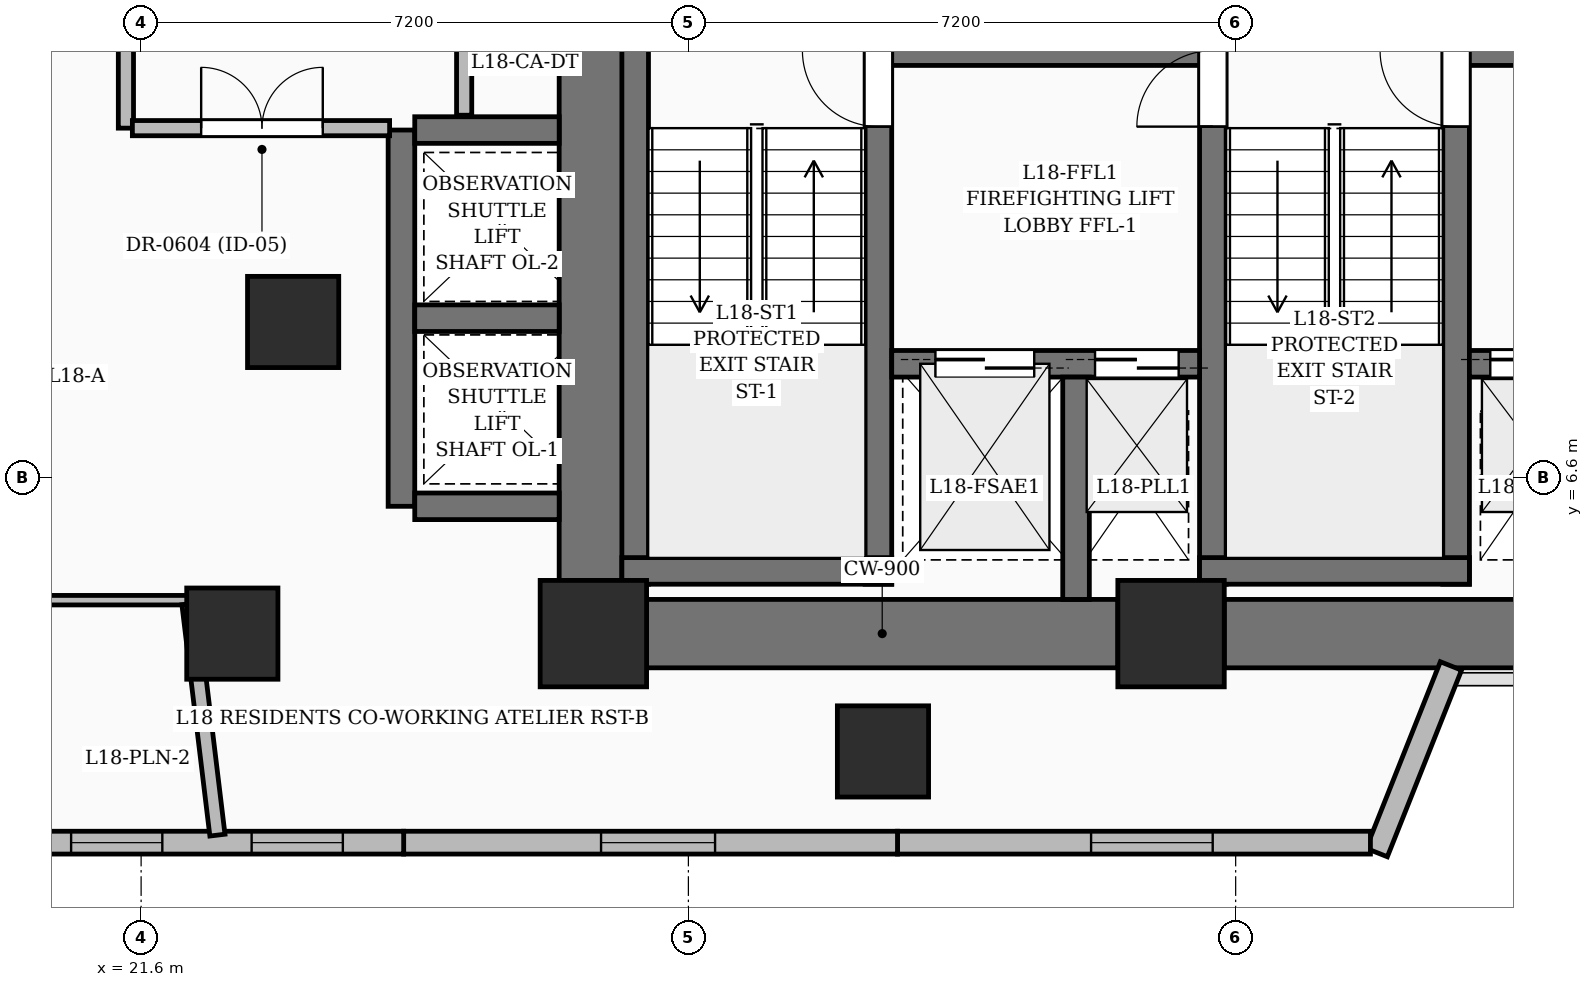
"""IFC4 building model, lengths in metres.
Left out: names, types, materials, properties, quantities, classifications, styles, units other than length and angle.
Written with IfcOpenShell. Run it as: python <this file> out.ifc"""

import sys

from ifc_helpers import new_model, si_unit, direction, frame, frame_2d, origin, origin_2d, place, context, subcontext, project, spatial, rectangle, extrude, element, fill, save


model = new_model("IFC4")
c1 = context("Model", 3, precision=1e-05, world=origin(), true_north=direction((0.0, 1.0)))
c2 = subcontext(c1, "Body", "Model", "MODEL_VIEW")
j1 = project(units=[si_unit("LENGTHUNIT", "METRE"), si_unit("PLANEANGLEUNIT", "RADIAN")], contexts=[c1])
p1 = place(None, origin())
s1 = spatial("IfcSite", under=j1, at=p1, CompositionType="ELEMENT")
p2 = place(p1, origin())
s2 = spatial("IfcBuilding", under=s1, at=p2, CompositionType="ELEMENT")
p3 = place(p2, frame((0.0, 0.0, 75.0)))
s3 = spatial("IfcBuildingStorey", under=s2, at=p3, CompositionType="ELEMENT", Elevation=75.0)
for number, where, z_axis, x_axis in (
    (1, (27.55, 4.55, 0.0), (0.0, 0.0, 1.0), (1.0, 0.0, 0.0)),
    (2, (35.15, 4.55, 0.0), (0.0, 0.0, 1.0), (1.0, 0.0, 0.0)),
):
    element("IfcColumn", number, at=place(p3, frame(where, z_axis=z_axis, x_axis=x_axis)), inside=s3, PredefinedType="COLUMN", context=c2, shape_type="SweptSolid", body=[
        extrude(rectangle(XDim=1.4, YDim=1.4, at=origin_2d()), origin(), (0.0, 0.0, 1.0), 3.6),
    ])
for number, where, z_axis, x_axis in (
    (3, (22.8, 4.55, 0.0), (0.0, 0.0, 1.0), (1.0, 0.0, 0.0)),
    (4, (23.6, 8.65, 0.0), (0.0, 0.0, 1.0), (1.0, 0.0, 0.0)),
):
    element("IfcColumn", number, at=place(p3, frame(where, z_axis=z_axis, x_axis=x_axis)), inside=s3, PredefinedType="COLUMN", context=c2, shape_type="SweptSolid", body=[
        extrude(rectangle(XDim=1.2, YDim=1.2, at=origin_2d()), origin(), (0.0, 0.0, 1.0), 3.6),
    ])
p4 = place(p3, frame((28.25, 4.55, 0.0), z_axis=(0.0, 0.0, 1.0), x_axis=(1.0, 0.0, 0.0)))
e5 = element("IfcWall", 5, at=p4, inside=s3, PredefinedType="SHEAR", context=c2, shape_type="SweptSolid", body=[
    extrude(rectangle(XDim=6.2, YDim=0.9, at=frame_2d((3.1, 0.0))), origin(), (0.0, 0.0, 1.0), 3.6),
])
p5 = place(p3, frame((35.85, 4.55, 0.0), z_axis=(0.0, 0.0, 1.0), x_axis=(1.0, 0.0, 0.0)))
e6 = element("IfcWall", 6, at=p5, inside=s3, PredefinedType="SHEAR", context=c2, shape_type="SweptSolid", body=[
    extrude(rectangle(XDim=10.5, YDim=0.9, at=frame_2d((5.25, 0.0))), origin(), (0.0, 0.0, 1.0), 3.6),
])
p6 = place(p3, frame((27.55, 5.25, 0.0), z_axis=(0.0, 0.0, 1.0), x_axis=(0.0, 1.0, 0.0)))
e7 = element("IfcWall", 7, at=p6, inside=s3, PredefinedType="SHEAR", context=c2, shape_type="SweptSolid", body=[
    extrude(rectangle(XDim=8.8, YDim=0.9, at=frame_2d((4.4, 0.0))), origin(), (0.0, 0.0, 1.0), 3.6),
])
p7 = place(p3, frame((28.1, 5.2, 0.0), z_axis=(0.0, 0.0, 1.0), x_axis=(0.0, 1.0, 0.0)))
e8 = element("IfcWall", 8, at=p7, inside=s3, PredefinedType="SOLIDWALL", context=c2, shape_type="SweptSolid", body=[
    extrude(rectangle(XDim=9.1, YDim=0.35, at=frame_2d((4.55, 0.0))), origin(), (0.0, 0.0, 1.0), 3.6),
])
p8 = place(p3, frame((31.3, 5.2, 0.0), z_axis=(0.0, 0.0, 1.0), x_axis=(0.0, 1.0, 0.0)))
e9 = element("IfcWall", 9, at=p8, inside=s3, PredefinedType="SOLIDWALL", context=c2, shape_type="SweptSolid", body=[
    extrude(rectangle(XDim=9.1, YDim=0.35, at=frame_2d((4.55, 0.0))), origin(), (0.0, 0.0, 1.0), 3.6),
])
p9 = place(p8, frame((6.02, 0.0, 0.0)))
e10 = element("IfcOpeningElement", 10, at=p9, cuts=e9, PredefinedType="OPENING", context=c2, shape_type="SweptSolid", body=[
    extrude(rectangle(XDim=1.0, YDim=2.15, at=frame_2d((0.5, 1.075))), frame((0.0, 0.185, 0.0), z_axis=(0.0, -1.0, 0.0), x_axis=(1.0, 0.0, 0.0)), (0.0, 0.0, 1.0), 0.37),
])
p10 = place(p3, frame((27.925, 5.375, 0.0), z_axis=(0.0, 0.0, 1.0), x_axis=(1.0, 0.0, 0.0)))
e11 = element("IfcWall", 11, at=p10, inside=s3, PredefinedType="SOLIDWALL", context=c2, shape_type="SweptSolid", body=[
    extrude(rectangle(XDim=3.55, YDim=0.35, at=frame_2d((1.775, 0.0))), origin(), (0.0, 0.0, 1.0), 3.6),
])
p11 = place(p3, frame((35.7, 5.2, 0.0), z_axis=(0.0, 0.0, 1.0), x_axis=(0.0, 1.0, 0.0)))
e12 = element("IfcWall", 12, at=p11, inside=s3, PredefinedType="SOLIDWALL", context=c2, shape_type="SweptSolid", body=[
    extrude(rectangle(XDim=9.1, YDim=0.35, at=frame_2d((4.55, 0.0))), origin(), (0.0, 0.0, 1.0), 3.6),
])
p12 = place(p11, frame((6.02, 0.0, 0.0)))
e13 = element("IfcOpeningElement", 13, at=p12, cuts=e12, PredefinedType="OPENING", context=c2, shape_type="SweptSolid", body=[
    extrude(rectangle(XDim=1.0, YDim=2.15, at=frame_2d((0.5, 1.075))), frame((0.0, 0.185, 0.0), z_axis=(0.0, -1.0, 0.0), x_axis=(1.0, 0.0, 0.0)), (0.0, 0.0, 1.0), 0.37),
])
p13 = place(p3, frame((38.9, 5.2, 0.0), z_axis=(0.0, 0.0, 1.0), x_axis=(0.0, 1.0, 0.0)))
e14 = element("IfcWall", 14, at=p13, inside=s3, PredefinedType="SOLIDWALL", context=c2, shape_type="SweptSolid", body=[
    extrude(rectangle(XDim=9.1, YDim=0.35, at=frame_2d((4.55, 0.0))), origin(), (0.0, 0.0, 1.0), 3.6),
])
p14 = place(p13, frame((6.02, 0.0, 0.0)))
e15 = element("IfcOpeningElement", 15, at=p14, cuts=e14, PredefinedType="OPENING", context=c2, shape_type="SweptSolid", body=[
    extrude(rectangle(XDim=1.0, YDim=2.15, at=frame_2d((0.5, 1.075))), frame((0.0, 0.185, 0.0), z_axis=(0.0, -1.0, 0.0), x_axis=(1.0, 0.0, 0.0)), (0.0, 0.0, 1.0), 0.37),
])
p15 = place(p3, frame((35.525, 5.375, 0.0), z_axis=(0.0, 0.0, 1.0), x_axis=(1.0, 0.0, 0.0)))
e16 = element("IfcWall", 16, at=p15, inside=s3, PredefinedType="SOLIDWALL", context=c2, shape_type="SweptSolid", body=[
    extrude(rectangle(XDim=3.55, YDim=0.35, at=frame_2d((1.775, 0.0))), origin(), (0.0, 0.0, 1.0), 3.6),
])
p16 = place(p3, frame((31.475, 8.1, 0.0), z_axis=(0.0, 0.0, 1.0), x_axis=(1.0, 0.0, 0.0)))
e17 = element("IfcWall", 17, at=p16, inside=s3, PredefinedType="SOLIDWALL", context=c2, shape_type="SweptSolid", body=[
    extrude(rectangle(XDim=4.05, YDim=0.35, at=frame_2d((2.025, 0.0))), origin(), (0.0, 0.0, 1.0), 3.6),
])
p17 = place(p16, frame((0.575, 0.0, 0.0)))
e18 = element("IfcOpeningElement", 18, at=p17, cuts=e17, PredefinedType="OPENING", context=c2, shape_type="SweptSolid", body=[
    extrude(rectangle(XDim=1.3, YDim=2.25, at=frame_2d((0.65, 1.125))), frame((0.0, 0.185, 0.0), z_axis=(0.0, -1.0, 0.0), x_axis=(1.0, 0.0, 0.0)), (0.0, 0.0, 1.0), 0.37),
])
p18 = place(p16, frame((2.675, 0.0, 0.0)))
e19 = element("IfcOpeningElement", 19, at=p18, cuts=e17, PredefinedType="OPENING", context=c2, shape_type="SweptSolid", body=[
    extrude(rectangle(XDim=1.1, YDim=2.2, at=frame_2d((0.55, 1.1))), frame((0.0, 0.185, 0.0), z_axis=(0.0, -1.0, 0.0), x_axis=(1.0, 0.0, 0.0)), (0.0, 0.0, 1.0), 0.37),
])
p19 = place(p3, frame((39.075, 8.1, 0.0), z_axis=(0.0, 0.0, 1.0), x_axis=(1.0, 0.0, 0.0)))
e20 = element("IfcWall", 20, at=p19, inside=s3, PredefinedType="SOLIDWALL", context=c2, shape_type="SweptSolid", body=[
    extrude(rectangle(XDim=4.05, YDim=0.35, at=frame_2d((2.025, 0.0))), origin(), (0.0, 0.0, 1.0), 3.6),
])
p20 = place(p19, frame((2.175, 0.0, 0.0)))
e21 = element("IfcOpeningElement", 21, at=p20, cuts=e20, PredefinedType="OPENING", context=c2, shape_type="SweptSolid", body=[
    extrude(rectangle(XDim=1.3, YDim=2.25, at=frame_2d((0.65, 1.125))), frame((0.0, 0.185, 0.0), z_axis=(0.0, -1.0, 0.0), x_axis=(1.0, 0.0, 0.0)), (0.0, 0.0, 1.0), 0.37),
])
p21 = place(p19, frame((0.275, 0.0, 0.0)))
e22 = element("IfcOpeningElement", 22, at=p21, cuts=e20, PredefinedType="OPENING", context=c2, shape_type="SweptSolid", body=[
    extrude(rectangle(XDim=1.1, YDim=2.2, at=frame_2d((0.55, 1.1))), frame((0.0, 0.185, 0.0), z_axis=(0.0, -1.0, 0.0), x_axis=(1.0, 0.0, 0.0)), (0.0, 0.0, 1.0), 0.37),
])
p22 = place(p3, frame((33.9, 5.0, 0.0), z_axis=(0.0, 0.0, 1.0), x_axis=(0.0, 1.0, 0.0)))
e23 = element("IfcWall", 23, at=p22, inside=s3, PredefinedType="SOLIDWALL", context=c2, shape_type="SweptSolid", body=[
    extrude(rectangle(XDim=2.925, YDim=0.35, at=frame_2d((1.462, 0.0))), origin(), (0.0, 0.0, 1.0), 3.6),
])
p23 = place(p3, frame((31.475, 12.2, 0.0), z_axis=(0.0, 0.0, 1.0), x_axis=(1.0, 0.0, 0.0)))
e24 = element("IfcWall", 24, at=p23, inside=s3, PredefinedType="SOLIDWALL", context=c2, shape_type="SweptSolid", body=[
    extrude(rectangle(XDim=4.05, YDim=0.35, at=frame_2d((2.025, 0.0))), origin(), (0.0, 0.0, 1.0), 3.6),
])
p24 = place(p3, frame((39.075, 12.2, 0.0), z_axis=(0.0, 0.0, 1.0), x_axis=(1.0, 0.0, 0.0)))
e25 = element("IfcWall", 25, at=p24, inside=s3, PredefinedType="SOLIDWALL", context=c2, shape_type="SweptSolid", body=[
    extrude(rectangle(XDim=4.05, YDim=0.35, at=frame_2d((2.025, 0.0))), origin(), (0.0, 0.0, 1.0), 3.6),
])
p25 = place(p3, frame((25.025, 6.225, 0.0), z_axis=(0.0, 0.0, 1.0), x_axis=(0.0, 1.0, 0.0)))
e26 = element("IfcWall", 26, at=p25, inside=s3, PredefinedType="SOLIDWALL", context=c2, shape_type="SweptSolid", body=[
    extrude(rectangle(XDim=4.95, YDim=0.35, at=frame_2d((2.475, 0.0))), origin(), (0.0, 0.0, 1.0), 3.6),
])
for number, where, z_axis, x_axis in (
    (27, (25.2, 6.225, 0.0), (0.0, 0.0, 1.0), (1.0, 0.0, 0.0)),
    (28, (25.2, 8.7, 0.0), (0.0, 0.0, 1.0), (1.0, 0.0, 0.0)),
    (29, (25.2, 11.175, 0.0), (0.0, 0.0, 1.0), (1.0, 0.0, 0.0)),
):
    element("IfcWall", number, at=place(p3, frame(where, z_axis=z_axis, x_axis=x_axis)), inside=s3, PredefinedType="SOLIDWALL", context=c2, shape_type="SweptSolid", body=[
        extrude(rectangle(XDim=1.9, YDim=0.35, at=frame_2d((0.95, 0.0))), origin(), (0.0, 0.0, 1.0), 3.6),
    ])
p26 = place(p3, frame((31.36, 3.0, 0.0), z_axis=(0.0, 0.0, 1.0), x_axis=(1.0, 0.0, 0.0)))
e30 = element("IfcColumn", 30, at=p26, inside=s3, PredefinedType="COLUMN", context=c2, shape_type="SweptSolid", body=[
    extrude(rectangle(XDim=1.2, YDim=1.2, at=origin_2d()), origin(), (0.0, 0.0, 1.0), 3.6),
])
p27 = place(p3, frame((38.833, 4.125, 0.0), z_axis=(0.0, 0.0, 1.0), x_axis=(-0.369557636099, -0.929207809696, 0.0)))
e31 = element("IfcWall", 31, at=p27, inside=s3, PredefinedType="SOLIDWALL", context=c2, shape_type="SweptSolid", body=[
    extrude(rectangle(XDim=2.642, YDim=0.3, at=frame_2d((1.321, 0.0))), origin(), (0.0, 0.0, 1.0), 2.35),
])
p28 = place(p3, frame((37.773, 1.8, 0.0), z_axis=(0.0, 0.0, 1.0), x_axis=(-1.0, 0.0, 0.0)))
e32 = element("IfcWall", 32, at=p28, inside=s3, PredefinedType="SOLIDWALL", context=c2, shape_type="SweptSolid", body=[
    extrude(rectangle(XDim=6.222, YDim=0.3, at=frame_2d((3.111, 0.0))), origin(), (0.0, 0.0, 1.0), 3.35),
])
p29 = place(p28, frame((2.075, 0.0, 0.55)))
e33 = element("IfcOpeningElement", 33, at=p29, cuts=e32, PredefinedType="OPENING", context=c2, shape_type="SweptSolid", body=[
    extrude(rectangle(XDim=1.6, YDim=2.2, at=frame_2d((0.8, 1.1))), frame((0.0, 0.16, 0.0), z_axis=(0.0, -1.0, 0.0), x_axis=(1.0, 0.0, 0.0)), (0.0, 0.0, 1.0), 0.32),
])
p30 = place(p3, frame((31.551, 1.8, 0.0), z_axis=(0.0, 0.0, 1.0), x_axis=(-1.0, 0.0, 0.0)))
e34 = element("IfcWall", 34, at=p30, inside=s3, PredefinedType="SOLIDWALL", context=c2, shape_type="SweptSolid", body=[
    extrude(rectangle(XDim=6.497, YDim=0.3, at=frame_2d((3.249, 0.0))), origin(), (0.0, 0.0, 1.0), 3.35),
])
p31 = place(p30, frame((2.4, 0.0, 0.6)))
e35 = element("IfcOpeningElement", 35, at=p31, cuts=e34, PredefinedType="OPENING", context=c2, shape_type="SweptSolid", body=[
    extrude(rectangle(XDim=1.5, YDim=2.1, at=frame_2d((0.75, 1.05))), frame((0.0, 0.16, 0.0), z_axis=(0.0, -1.0, 0.0), x_axis=(1.0, 0.0, 0.0)), (0.0, 0.0, 1.0), 0.32),
])
p32 = place(p3, frame((25.054, 1.8, 0.0), z_axis=(0.0, 0.0, 1.0), x_axis=(-1.0, 0.0, 0.0)))
e36 = element("IfcWall", 36, at=p32, inside=s3, PredefinedType="SOLIDWALL", context=c2, shape_type="SweptSolid", body=[
    extrude(rectangle(XDim=6.497, YDim=0.3, at=frame_2d((3.249, 0.0))), origin(), (0.0, 0.0, 1.0), 3.35),
])
p33 = place(p32, frame((3.175, 0.0, 0.8)))
e37 = element("IfcOpeningElement", 37, at=p33, cuts=e36, PredefinedType="OPENING", context=c2, shape_type="SweptSolid", body=[
    extrude(rectangle(XDim=1.2, YDim=1.8, at=frame_2d((0.6, 0.9))), frame((0.0, 0.16, 0.0), z_axis=(0.0, -1.0, 0.0), x_axis=(1.0, 0.0, 0.0)), (0.0, 0.0, 1.0), 0.32),
])
p34 = place(p32, frame((0.8, 0.0, 0.8)))
e38 = element("IfcOpeningElement", 38, at=p34, cuts=e36, PredefinedType="OPENING", context=c2, shape_type="SweptSolid", body=[
    extrude(rectangle(XDim=1.2, YDim=1.8, at=frame_2d((0.6, 0.9))), frame((0.0, 0.16, 0.0), z_axis=(0.0, -1.0, 0.0), x_axis=(1.0, 0.0, 0.0)), (0.0, 0.0, 1.0), 0.32),
])
p35 = place(p3, frame((25.85, 11.37, 0.0), z_axis=(0.0, 0.0, 1.0), x_axis=(0.0, 1.0, 0.0)))
e39 = element("IfcWall", 39, at=p35, inside=s3, PredefinedType="PARTITIONING", context=c2, shape_type="SweptSolid", body=[
    extrude(rectangle(XDim=3.34, YDim=0.2, at=frame_2d((1.67, 0.0))), origin(), (0.0, 0.0, 1.0), 3.35),
])
p36 = place(p35, frame((1.9, 0.0, 0.0)))
e40 = element("IfcOpeningElement", 40, at=p36, cuts=e39, PredefinedType="OPENING", context=c2, shape_type="SweptSolid", body=[
    extrude(rectangle(XDim=0.9, YDim=2.1, at=frame_2d((0.45, 1.05))), frame((0.0, 0.11, 0.0), z_axis=(0.0, -1.0, 0.0), x_axis=(1.0, 0.0, 0.0)), (0.0, 0.0, 1.0), 0.22),
])
p37 = place(p3, frame((21.4, 15.0, 0.0), z_axis=(0.0, 0.0, 1.0), x_axis=(0.0, -1.0, 0.0)))
e41 = element("IfcWall", 41, at=p37, inside=s3, PredefinedType="PARTITIONING", context=c2, shape_type="SweptSolid", body=[
    extrude(rectangle(XDim=3.8, YDim=0.2, at=frame_2d((1.9, 0.0))), origin(), (0.0, 0.0, 1.0), 2.911),
])
p38 = place(p37, frame((1.262, 0.0, 0.0)))
e42 = element("IfcOpeningElement", 42, at=p38, cuts=e41, PredefinedType="OPENING", context=c2, shape_type="SweptSolid", body=[
    extrude(rectangle(XDim=1.0, YDim=2.2, at=frame_2d((0.5, 1.1))), frame((0.0, 0.11, 0.0), z_axis=(0.0, -1.0, 0.0), x_axis=(1.0, 0.0, 0.0)), (0.0, 0.0, 1.0), 0.22),
])
p39 = place(p3, frame((21.485, 11.2, 0.0), z_axis=(0.0, 0.0, 1.0), x_axis=(1.0, 0.0, 0.0)))
e43 = element("IfcWall", 43, at=p39, inside=s3, PredefinedType="PARTITIONING", context=c2, shape_type="SweptSolid", body=[
    extrude(rectangle(XDim=3.384, YDim=0.2, at=frame_2d((1.692, 0.0))), origin(), (0.0, 0.0, 1.0), 3.35),
])
p40 = place(p39, frame((0.905, 0.0, 0.0)))
e44 = element("IfcOpeningElement", 44, at=p40, cuts=e43, PredefinedType="OPENING", context=c2, shape_type="SweptSolid", body=[
    extrude(rectangle(XDim=1.6, YDim=2.3, at=frame_2d((0.8, 1.15))), frame((0.0, 0.11, 0.0), z_axis=(0.0, -1.0, 0.0), x_axis=(1.0, 0.0, 0.0)), (0.0, 0.0, 1.0), 0.22),
])
p41 = place(p3, frame((20.11, 4.99, 0.0), z_axis=(0.0, 0.0, 1.0), x_axis=(1.0, 0.0, 0.0)))
e45 = element("IfcWall", 45, at=p41, inside=s3, PredefinedType="PARTITIONING", context=c2, shape_type="SweptSolid", body=[
    extrude(rectangle(XDim=2.12, YDim=0.125, at=frame_2d((1.06, 0.0))), origin(), (0.0, 0.0, 1.0), 2.911),
])
p42 = place(p3, frame((21.34, 15.1, 0.0), z_axis=(0.0, 0.0, 1.0), x_axis=(-0.706759638276, -0.707453753756, 0.0)))
e46 = element("IfcWall", 46, at=p42, inside=s3, PredefinedType="PARTITIONING", context=c2, shape_type="SweptSolid", body=[
    extrude(rectangle(XDim=13.014, YDim=0.2, at=frame_2d((6.507, 0.0))), origin(), (0.0, 0.0, 1.0), 2.345),
])
p43 = place(p3, frame((22.604, 1.899, 0.0), z_axis=(0.0, 0.0, 1.0), x_axis=(-0.120074545748, 0.992764878238, 0.0)))
e47 = element("IfcWall", 47, at=p43, inside=s3, PredefinedType="PARTITIONING", context=c2, shape_type="SweptSolid", body=[
    extrude(rectangle(XDim=3.066, YDim=0.2, at=frame_2d((1.533, 0.0))), origin(), (0.0, 0.0, 1.0), 2.345),
])
p44 = place(p29, origin())
e48 = element("IfcWindow", 48, at=p44, inside=s3, PartitioningType="SINGLE_PANEL", PredefinedType="WINDOW", context=c2, shape_type="SweptSolid", body=[
    extrude(rectangle(XDim=1.6, YDim=2.2, at=frame_2d((0.8, 1.1))), frame((0.0, 0.03, 0.0), z_axis=(0.0, -1.0, 0.0), x_axis=(1.0, 0.0, 0.0)), (0.0, 0.0, 1.0), 0.06),
])
fill(e33, e48)
p45 = place(p31, origin())
e49 = element("IfcWindow", 49, at=p45, inside=s3, PartitioningType="SINGLE_PANEL", PredefinedType="WINDOW", context=c2, shape_type="SweptSolid", body=[
    extrude(rectangle(XDim=1.5, YDim=2.1, at=frame_2d((0.75, 1.05))), frame((0.0, 0.03, 0.0), z_axis=(0.0, -1.0, 0.0), x_axis=(1.0, 0.0, 0.0)), (0.0, 0.0, 1.0), 0.06),
])
fill(e35, e49)
p46 = place(p33, origin())
e50 = element("IfcWindow", 50, at=p46, inside=s3, PartitioningType="SINGLE_PANEL", PredefinedType="WINDOW", context=c2, shape_type="SweptSolid", body=[
    extrude(rectangle(XDim=1.2, YDim=1.8, at=frame_2d((0.6, 0.9))), frame((0.0, 0.03, 0.0), z_axis=(0.0, -1.0, 0.0), x_axis=(1.0, 0.0, 0.0)), (0.0, 0.0, 1.0), 0.06),
])
fill(e37, e50)
p47 = place(p34, origin())
e51 = element("IfcWindow", 51, at=p47, inside=s3, PartitioningType="SINGLE_PANEL", PredefinedType="WINDOW", context=c2, shape_type="SweptSolid", body=[
    extrude(rectangle(XDim=1.2, YDim=1.8, at=frame_2d((0.6, 0.9))), frame((0.0, 0.03, 0.0), z_axis=(0.0, -1.0, 0.0), x_axis=(1.0, 0.0, 0.0)), (0.0, 0.0, 1.0), 0.06),
])
fill(e38, e51)
p48 = place(p9, origin())
e52 = element("IfcDoor", 52, at=p48, inside=s3, OperationType="SINGLE_SWING_RIGHT", PredefinedType="DOOR", context=c2, shape_type="SweptSolid", body=[
    extrude(rectangle(XDim=1.0, YDim=2.15, at=frame_2d((0.5, 1.075))), frame((0.0, 0.025, 0.0), z_axis=(0.0, -1.0, 0.0), x_axis=(1.0, 0.0, 0.0)), (0.0, 0.0, 1.0), 0.05),
])
fill(e10, e52)
p49 = place(p12, origin())
e53 = element("IfcDoor", 53, at=p49, inside=s3, OperationType="SINGLE_SWING_LEFT", PredefinedType="DOOR", context=c2, shape_type="SweptSolid", body=[
    extrude(rectangle(XDim=1.0, YDim=2.15, at=frame_2d((0.5, 1.075))), frame((0.0, 0.025, 0.0), z_axis=(0.0, -1.0, 0.0), x_axis=(1.0, 0.0, 0.0)), (0.0, 0.0, 1.0), 0.05),
])
fill(e13, e53)
p50 = place(p14, origin())
e54 = element("IfcDoor", 54, at=p50, inside=s3, OperationType="SINGLE_SWING_RIGHT", PredefinedType="DOOR", context=c2, shape_type="SweptSolid", body=[
    extrude(rectangle(XDim=1.0, YDim=2.15, at=frame_2d((0.5, 1.075))), frame((0.0, 0.025, 0.0), z_axis=(0.0, -1.0, 0.0), x_axis=(1.0, 0.0, 0.0)), (0.0, 0.0, 1.0), 0.05),
])
fill(e15, e54)
p51 = place(p17, origin())
e55 = element("IfcDoor", 55, at=p51, inside=s3, OperationType="DOUBLE_DOOR_SLIDING", PredefinedType="DOOR", context=c2, shape_type="SweptSolid", body=[
    extrude(rectangle(XDim=1.3, YDim=2.25, at=frame_2d((0.65, 1.125))), frame((0.0, 0.025, 0.0), z_axis=(0.0, -1.0, 0.0), x_axis=(1.0, 0.0, 0.0)), (0.0, 0.0, 1.0), 0.05),
])
fill(e18, e55)
p52 = place(p18, origin())
e56 = element("IfcDoor", 56, at=p52, inside=s3, OperationType="DOUBLE_DOOR_SLIDING", PredefinedType="DOOR", context=c2, shape_type="SweptSolid", body=[
    extrude(rectangle(XDim=1.1, YDim=2.2, at=frame_2d((0.55, 1.1))), frame((0.0, 0.025, 0.0), z_axis=(0.0, -1.0, 0.0), x_axis=(1.0, 0.0, 0.0)), (0.0, 0.0, 1.0), 0.05),
])
fill(e19, e56)
p53 = place(p21, origin())
e57 = element("IfcDoor", 57, at=p53, inside=s3, OperationType="DOUBLE_DOOR_SLIDING", PredefinedType="DOOR", context=c2, shape_type="SweptSolid", body=[
    extrude(rectangle(XDim=1.1, YDim=2.2, at=frame_2d((0.55, 1.1))), frame((0.0, 0.025, 0.0), z_axis=(0.0, -1.0, 0.0), x_axis=(1.0, 0.0, 0.0)), (0.0, 0.0, 1.0), 0.05),
])
fill(e22, e57)
p54 = place(p40, origin())
e58 = element("IfcDoor", 58, at=p54, inside=s3, OperationType="DOUBLE_DOOR_SINGLE_SWING", PredefinedType="DOOR", context=c2, shape_type="SweptSolid", body=[
    extrude(rectangle(XDim=1.6, YDim=2.3, at=frame_2d((0.8, 1.15))), frame((0.0, 0.025, 0.0), z_axis=(0.0, -1.0, 0.0), x_axis=(1.0, 0.0, 0.0)), (0.0, 0.0, 1.0), 0.05),
])
fill(e44, e58)
save(model, sys.argv[1])
